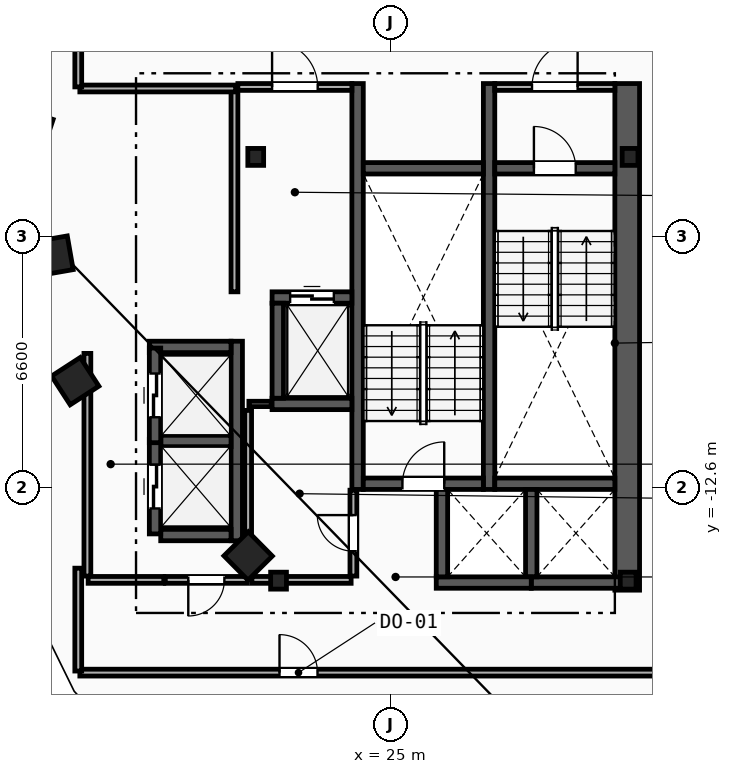
"""IFC4 building model, lengths in metres.
Left out: names, types, materials, properties, quantities, classifications, styles, units other than length and angle.
Written with IfcOpenShell. Run it as: python <this file> out.ifc"""

import sys

from ifc_helpers import new_model, si_unit, direction, frame, frame_2d, origin, origin_2d, place, context, subcontext, project, spatial, rectangle, i_section, extrude, element, fill, save


model = new_model("IFC4")
c1 = context("Model", 3, precision=1e-05, world=origin(), true_north=direction((0.0, 1.0)))
c2 = subcontext(c1, "Body", "Model", "MODEL_VIEW")
j1 = project(units=[si_unit("LENGTHUNIT", "METRE"), si_unit("PLANEANGLEUNIT", "RADIAN")], contexts=[c1])
p1 = place(None, origin())
s1 = spatial("IfcSite", under=j1, at=p1, CompositionType="ELEMENT")
p2 = place(p1, origin())
s2 = spatial("IfcBuilding", under=s1, at=p2, CompositionType="ELEMENT")
p3 = place(p2, frame((0.0, 0.0, 191.8)))
s3 = spatial("IfcBuildingStorey", under=s2, at=p3, CompositionType="ELEMENT", Elevation=191.8)
for number, where, z_axis, x_axis in (
    (1, (31.3, -3.9, 0.0), (0.0, 0.0, 1.0), (1.0, 0.0, 0.0)),
    (2, (21.45, -3.9, 0.0), (0.0, 0.0, 1.0), (1.0, 0.0, 0.0)),
    (3, (22.05, -15.05, 0.0), (0.0, 0.0, 1.0), (1.0, 0.0, 0.0)),
    (4, (31.25, -15.05, 0.0), (0.0, 0.0, 1.0), (1.0, 0.0, 0.0)),
):
    element("IfcColumn", number, at=place(p3, frame(where, z_axis=z_axis, x_axis=x_axis)), inside=s3, PredefinedType="COLUMN", context=c2, shape_type="SweptSolid", body=[
        extrude(i_section(OverallWidth=0.416, OverallDepth=0.446, WebThickness=0.039, FlangeThickness=0.063, FilletRadius=0.018, at=origin_2d()), origin(), (0.0, 0.0, 1.0), 3.6),
    ])
for number, where, z_axis, x_axis in (
    (5, (15.55, -3.2, 0.0), (0.0, 0.0, 1.0), (-0.315, -0.949, 0.0)),
    (6, (16.125, -6.5, 0.0), (0.0, 0.0, 1.0), (0.172, -0.985, 0.0)),
    (7, (16.7, -9.8, 0.0), (0.0, 0.0, 1.0), (0.544, -0.839, 0.0)),
    (8, (21.25, -14.4, 0.0), (0.0, 0.0, 1.0), (0.703, -0.711, 0.0)),
):
    element("IfcColumn", number, at=place(p3, frame(where, z_axis=z_axis, x_axis=x_axis)), inside=s3, PredefinedType="COLUMN", context=c2, shape_type="SweptSolid", body=[
        extrude(rectangle(XDim=0.9, YDim=0.9, at=origin_2d()), origin(), (0.0, 0.0, 1.0), 3.6),
    ])
p4 = place(p3, frame((31.225, -15.3, 0.0), z_axis=(0.0, 0.0, 1.0), x_axis=(0.0, 1.0, 0.0)))
e9 = element("IfcWall", 9, at=p4, inside=s3, PredefinedType="SHEAR", context=c2, shape_type="SweptSolid", body=[
    extrude(rectangle(XDim=13.33, YDim=0.65, at=frame_2d((6.665, 0.0))), origin(), (0.0, 0.0, 1.0), 3.34),
])
for number, where, z_axis, x_axis in (
    (10, (27.59, -12.65, 0.0), (0.0, 0.0, 1.0), (0.0, 1.0, 0.0)),
    (11, (24.13, -12.65, 0.0), (0.0, 0.0, 1.0), (0.0, 1.0, 0.0)),
):
    element("IfcWall", number, at=place(p3, frame(where, z_axis=z_axis, x_axis=x_axis)), inside=s3, PredefinedType="SHEAR", context=c2, shape_type="SweptSolid", body=[
        extrude(rectangle(XDim=10.68, YDim=0.3, at=frame_2d((5.34, 0.0))), origin(), (0.0, 0.0, 1.0), 3.34),
    ])
p5 = place(p3, frame((27.74, -4.2, 0.0), z_axis=(0.0, 0.0, 1.0), x_axis=(1.0, 0.0, 0.0)))
e12 = element("IfcWall", 12, at=p5, inside=s3, PredefinedType="SHEAR", context=c2, shape_type="SweptSolid", body=[
    extrude(rectangle(XDim=3.16, YDim=0.3, at=frame_2d((1.58, 0.0))), origin(), (0.0, 0.0, 1.0), 3.34),
])
p6 = place(p5, frame((1.03, 0.0, 0.0)))
e13 = element("IfcOpeningElement", 13, at=p6, cuts=e12, PredefinedType="OPENING", context=c2, shape_type="SweptSolid", body=[
    extrude(rectangle(XDim=1.1, YDim=2.15, at=frame_2d((0.55, 1.075))), frame((0.0, 0.16, 0.0), z_axis=(0.0, -1.0, 0.0), x_axis=(1.0, 0.0, 0.0)), (0.0, 0.0, 1.0), 0.32),
])
p7 = place(p3, frame((27.74, -12.5, 0.0), z_axis=(0.0, 0.0, 1.0), x_axis=(1.0, 0.0, 0.0)))
e14 = element("IfcWall", 14, at=p7, inside=s3, PredefinedType="SHEAR", context=c2, shape_type="SweptSolid", body=[
    extrude(rectangle(XDim=3.16, YDim=0.3, at=frame_2d((1.58, 0.0))), origin(), (0.0, 0.0, 1.0), 3.34),
])
p8 = place(p3, frame((24.28, -12.5, 0.0), z_axis=(0.0, 0.0, 1.0), x_axis=(1.0, 0.0, 0.0)))
e15 = element("IfcWall", 15, at=p8, inside=s3, PredefinedType="SHEAR", context=c2, shape_type="SweptSolid", body=[
    extrude(rectangle(XDim=3.16, YDim=0.3, at=frame_2d((1.58, 0.0))), origin(), (0.0, 0.0, 1.0), 3.34),
])
p9 = place(p8, frame((1.03, 0.0, 0.0)))
e16 = element("IfcOpeningElement", 16, at=p9, cuts=e15, PredefinedType="OPENING", context=c2, shape_type="SweptSolid", body=[
    extrude(rectangle(XDim=1.1, YDim=2.15, at=frame_2d((0.55, 1.075))), frame((0.0, 0.16, 0.0), z_axis=(0.0, -1.0, 0.0), x_axis=(1.0, 0.0, 0.0)), (0.0, 0.0, 1.0), 0.32),
])
p10 = place(p3, frame((24.28, -4.2, 0.0), z_axis=(0.0, 0.0, 1.0), x_axis=(1.0, 0.0, 0.0)))
e17 = element("IfcWall", 17, at=p10, inside=s3, PredefinedType="SHEAR", context=c2, shape_type="SweptSolid", body=[
    extrude(rectangle(XDim=3.16, YDim=0.3, at=frame_2d((1.58, 0.0))), origin(), (0.0, 0.0, 1.0), 3.34),
])
p11 = place(p3, frame((20.89, -7.45, 0.0), z_axis=(0.0, 0.0, 1.0), x_axis=(0.0, 1.0, 0.0)))
e18 = element("IfcWall", 18, at=p11, inside=s3, PredefinedType="PARTITIONING", context=c2, shape_type="SweptSolid", body=[
    extrude(rectangle(XDim=5.3, YDim=0.18, at=frame_2d((2.65, 0.0))), origin(), (0.0, 0.0, 1.0), 3.34),
])
p12 = place(p3, frame((20.98, -2.06, 0.0), z_axis=(0.0, 0.0, 1.0), x_axis=(1.0, 0.0, 0.0)))
e19 = element("IfcWall", 19, at=p12, inside=s3, PredefinedType="PARTITIONING", context=c2, shape_type="SweptSolid", body=[
    extrude(rectangle(XDim=3.0, YDim=0.18, at=frame_2d((1.5, 0.0))), origin(), (0.0, 0.0, 1.0), 3.34),
])
p13 = place(p12, frame((0.9, 0.0, 0.0)))
e20 = element("IfcOpeningElement", 20, at=p13, cuts=e19, PredefinedType="OPENING", context=c2, shape_type="SweptSolid", body=[
    extrude(rectangle(XDim=1.2, YDim=2.15, at=frame_2d((0.6, 1.075))), frame((0.0, 0.1, 0.0), z_axis=(0.0, -1.0, 0.0), x_axis=(1.0, 0.0, 0.0)), (0.0, 0.0, 1.0), 0.2),
])
p14 = place(p3, frame((27.74, -2.06, 0.0), z_axis=(0.0, 0.0, 1.0), x_axis=(1.0, 0.0, 0.0)))
e21 = element("IfcWall", 21, at=p14, inside=s3, PredefinedType="PARTITIONING", context=c2, shape_type="SweptSolid", body=[
    extrude(rectangle(XDim=3.16, YDim=0.18, at=frame_2d((1.58, 0.0))), origin(), (0.0, 0.0, 1.0), 3.34),
])
p15 = place(p14, frame((0.98, 0.0, 0.0)))
e22 = element("IfcOpeningElement", 22, at=p15, cuts=e21, PredefinedType="OPENING", context=c2, shape_type="SweptSolid", body=[
    extrude(rectangle(XDim=1.2, YDim=2.15, at=frame_2d((0.6, 1.075))), frame((0.0, 0.1, 0.0), z_axis=(0.0, -1.0, 0.0), x_axis=(1.0, 0.0, 0.0)), (0.0, 0.0, 1.0), 0.2),
])
p16 = place(p3, frame((21.88, -7.6, 0.0), z_axis=(0.0, 0.0, 1.0), x_axis=(1.0, 0.0, 0.0)))
e23 = element("IfcWall", 23, at=p16, inside=s3, PredefinedType="SHEAR", context=c2, shape_type="SweptSolid", body=[
    extrude(rectangle(XDim=2.1, YDim=0.3, at=frame_2d((1.05, 0.0))), origin(), (0.0, 0.0, 1.0), 3.34),
])
p17 = place(p16, frame((0.475, 0.0, 0.0)))
e24 = element("IfcOpeningElement", 24, at=p17, cuts=e23, PredefinedType="OPENING", context=c2, shape_type="SweptSolid", body=[
    extrude(rectangle(XDim=1.15, YDim=2.2, at=frame_2d((0.575, 1.1))), frame((0.0, 0.16, 0.0), z_axis=(0.0, -1.0, 0.0), x_axis=(1.0, 0.0, 0.0)), (0.0, 0.0, 1.0), 0.32),
])
p18 = place(p3, frame((21.88, -10.4, 0.0), z_axis=(0.0, 0.0, 1.0), x_axis=(1.0, 0.0, 0.0)))
e25 = element("IfcWall", 25, at=p18, inside=s3, PredefinedType="SHEAR", context=c2, shape_type="SweptSolid", body=[
    extrude(rectangle(XDim=2.1, YDim=0.3, at=frame_2d((1.05, 0.0))), origin(), (0.0, 0.0, 1.0), 3.34),
])
for number, where, z_axis, x_axis in (
    (26, (22.03, -10.25, 0.0), (0.0, 0.0, 1.0), (0.0, 1.0, 0.0)),
    (27, (28.7, -15.1, 0.0), (0.0, 0.0, 1.0), (1.0, 0.0, 0.0)),
):
    element("IfcWall", number, at=place(p3, frame(where, z_axis=z_axis, x_axis=x_axis)), inside=s3, PredefinedType="SHEAR", context=c2, shape_type="SweptSolid", body=[
        extrude(rectangle(XDim=2.5, YDim=0.3, at=frame_2d((1.25, 0.0))), origin(), (0.0, 0.0, 1.0), 3.34),
    ])
p19 = place(p3, frame((28.7, -14.95, 0.0), z_axis=(0.0, 0.0, 1.0), x_axis=(0.0, 1.0, 0.0)))
e28 = element("IfcWall", 28, at=p19, inside=s3, PredefinedType="SHEAR", context=c2, shape_type="SweptSolid", body=[
    extrude(rectangle(XDim=2.3, YDim=0.3, at=frame_2d((1.15, 0.0))), origin(), (0.0, 0.0, 1.0), 3.34),
])
p20 = place(p3, frame((26.2, -15.1, 0.0), z_axis=(0.0, 0.0, 1.0), x_axis=(1.0, 0.0, 0.0)))
e29 = element("IfcWall", 29, at=p20, inside=s3, PredefinedType="SHEAR", context=c2, shape_type="SweptSolid", body=[
    extrude(rectangle(XDim=2.5, YDim=0.3, at=frame_2d((1.25, 0.0))), origin(), (0.0, 0.0, 1.0), 3.34),
])
p21 = place(p3, frame((26.35, -14.95, 0.0), z_axis=(0.0, 0.0, 1.0), x_axis=(0.0, 1.0, 0.0)))
e30 = element("IfcWall", 30, at=p21, inside=s3, PredefinedType="SHEAR", context=c2, shape_type="SweptSolid", body=[
    extrude(rectangle(XDim=2.3, YDim=0.3, at=frame_2d((1.15, 0.0))), origin(), (0.0, 0.0, 1.0), 3.34),
])
p22 = place(p3, frame((20.95, -14.0, 0.0), z_axis=(0.0, 0.0, 1.0), x_axis=(0.0, 1.0, 0.0)))
e31 = element("IfcWall", 31, at=p22, inside=s3, PredefinedType="SHEAR", context=c2, shape_type="SweptSolid", body=[
    extrude(rectangle(XDim=5.25, YDim=0.3, at=frame_2d((2.625, 0.0))), origin(), (0.0, 0.0, 1.0), 3.34),
])
p23 = place(p3, frame((18.95, -13.85, 0.0), z_axis=(0.0, 0.0, 1.0), x_axis=(1.0, 0.0, 0.0)))
e32 = element("IfcWall", 32, at=p23, inside=s3, PredefinedType="SHEAR", context=c2, shape_type="SweptSolid", body=[
    extrude(rectangle(XDim=1.85, YDim=0.3, at=frame_2d((0.925, 0.0))), origin(), (0.0, 0.0, 1.0), 3.34),
])
p24 = place(p3, frame((18.65, -8.9, 0.0), z_axis=(0.0, 0.0, 1.0), x_axis=(1.0, 0.0, 0.0)))
e33 = element("IfcWall", 33, at=p24, inside=s3, PredefinedType="SHEAR", context=c2, shape_type="SweptSolid", body=[
    extrude(rectangle(XDim=2.15, YDim=0.3, at=frame_2d((1.075, 0.0))), origin(), (0.0, 0.0, 1.0), 3.34),
])
p25 = place(p3, frame((18.95, -11.375, 0.0), z_axis=(0.0, 0.0, 1.0), x_axis=(1.0, 0.0, 0.0)))
e34 = element("IfcWall", 34, at=p25, inside=s3, PredefinedType="SHEAR", context=c2, shape_type="SweptSolid", body=[
    extrude(rectangle(XDim=1.85, YDim=0.3, at=frame_2d((0.925, 0.0))), origin(), (0.0, 0.0, 1.0), 3.34),
])
p26 = place(p3, frame((18.8, -13.82, 0.0), z_axis=(0.0, 0.0, 1.0), x_axis=(0.0, 1.0, 0.0)))
e35 = element("IfcWall", 35, at=p26, inside=s3, PredefinedType="SHEAR", context=c2, shape_type="SweptSolid", body=[
    extrude(rectangle(XDim=2.49, YDim=0.3, at=frame_2d((1.245, 0.0))), origin(), (0.0, 0.0, 1.0), 3.34),
])
p27 = place(p26, frame((0.67, 0.0, 0.0)))
e36 = element("IfcOpeningElement", 36, at=p27, cuts=e35, PredefinedType="OPENING", context=c2, shape_type="SweptSolid", body=[
    extrude(rectangle(XDim=1.15, YDim=2.2, at=frame_2d((0.575, 1.1))), frame((0.0, 0.16, 0.0), z_axis=(0.0, -1.0, 0.0), x_axis=(1.0, 0.0, 0.0)), (0.0, 0.0, 1.0), 0.32),
])
p28 = place(p3, frame((18.8, -11.42, 0.0), z_axis=(0.0, 0.0, 1.0), x_axis=(0.0, 1.0, 0.0)))
e37 = element("IfcWall", 37, at=p28, inside=s3, PredefinedType="SHEAR", context=c2, shape_type="SweptSolid", body=[
    extrude(rectangle(XDim=2.49, YDim=0.3, at=frame_2d((1.245, 0.0))), origin(), (0.0, 0.0, 1.0), 3.34),
])
p29 = place(p28, frame((0.67, 0.0, 0.0)))
e38 = element("IfcOpeningElement", 38, at=p29, cuts=e37, PredefinedType="OPENING", context=c2, shape_type="SweptSolid", body=[
    extrude(rectangle(XDim=1.15, YDim=2.2, at=frame_2d((0.575, 1.1))), frame((0.0, 0.16, 0.0), z_axis=(0.0, -1.0, 0.0), x_axis=(1.0, 0.0, 0.0)), (0.0, 0.0, 1.0), 0.32),
])
p30 = place(p3, frame((17.02, -14.93, 0.0), z_axis=(0.0, 0.0, 1.0), x_axis=(0.0, 1.0, 0.0)))
e39 = element("IfcWall", 39, at=p30, inside=s3, PredefinedType="PARTITIONING", context=c2, shape_type="SweptSolid", body=[
    extrude(rectangle(XDim=5.86, YDim=0.18, at=frame_2d((2.93, 0.0))), origin(), (0.0, 0.0, 1.0), 3.34),
])
p31 = place(p3, frame((17.04, -15.03, 0.0), z_axis=(0.0, 0.0, 1.0), x_axis=(1.0, 0.0, 0.0)))
e40 = element("IfcWall", 40, at=p31, inside=s3, PredefinedType="PARTITIONING", context=c2, shape_type="SweptSolid", body=[
    extrude(rectangle(XDim=1.99, YDim=0.18, at=frame_2d((0.995, 0.0))), origin(), (0.0, 0.0, 1.0), 3.34),
])
p32 = place(p3, frame((21.23, -15.03, 0.0), z_axis=(0.0, 0.0, 1.0), x_axis=(-1.0, 0.0, 0.0)))
e41 = element("IfcWall", 41, at=p32, inside=s3, PredefinedType="PARTITIONING", context=c2, shape_type="SweptSolid", body=[
    extrude(rectangle(XDim=2.16, YDim=0.18, at=frame_2d((1.08, 0.0))), origin(), (0.0, 0.0, 1.0), 3.34),
])
p33 = place(p32, frame((0.605, 0.0, 0.0)))
e42 = element("IfcOpeningElement", 42, at=p33, cuts=e41, PredefinedType="OPENING", context=c2, shape_type="SweptSolid", body=[
    extrude(rectangle(XDim=0.95, YDim=2.1, at=frame_2d((0.475, 1.05))), frame((0.0, 0.1, 0.0), z_axis=(0.0, -1.0, 0.0), x_axis=(1.0, 0.0, 0.0)), (0.0, 0.0, 1.0), 0.2),
])
p34 = place(p3, frame((21.27, -10.4, 0.0), z_axis=(0.0, 0.0, 1.0), x_axis=(1.0, 0.0, 0.0)))
e43 = element("IfcWall", 43, at=p34, inside=s3, PredefinedType="PARTITIONING", context=c2, shape_type="SweptSolid", body=[
    extrude(rectangle(XDim=0.59, YDim=0.14, at=frame_2d((0.295, 0.0))), origin(), (0.0, 0.0, 1.0), 3.34),
])
p35 = place(p3, frame((21.25, -14.93, 0.0), z_axis=(0.0, 0.0, 1.0), x_axis=(0.0, 1.0, 0.0)))
e44 = element("IfcWall", 44, at=p35, inside=s3, PredefinedType="PARTITIONING", context=c2, shape_type="SweptSolid", body=[
    extrude(rectangle(XDim=4.36, YDim=0.18, at=frame_2d((2.18, 0.0))), origin(), (0.0, 0.0, 1.0), 3.34),
])
p36 = place(p3, frame((21.35, -15.03, 0.0), z_axis=(0.0, 0.0, 1.0), x_axis=(1.0, 0.0, 0.0)))
e45 = element("IfcWall", 45, at=p36, inside=s3, PredefinedType="PARTITIONING", context=c2, shape_type="SweptSolid", body=[
    extrude(rectangle(XDim=2.61, YDim=0.18, at=frame_2d((1.305, 0.0))), origin(), (0.0, 0.0, 1.0), 2.413),
])
p37 = place(p3, frame((24.02, -14.93, 0.0), z_axis=(0.0, 0.0, 1.0), x_axis=(0.0, 1.0, 0.0)))
e46 = element("IfcWall", 46, at=p37, inside=s3, PredefinedType="PARTITIONING", context=c2, shape_type="SweptSolid", body=[
    extrude(rectangle(XDim=2.26, YDim=0.18, at=frame_2d((1.13, 0.0))), origin(), (0.0, 0.0, 1.0), 3.34),
])
p38 = place(p37, frame((0.655, 0.0, 0.0)))
e47 = element("IfcOpeningElement", 47, at=p38, cuts=e46, PredefinedType="OPENING", context=c2, shape_type="SweptSolid", body=[
    extrude(rectangle(XDim=0.95, YDim=2.1, at=frame_2d((0.475, 1.05))), frame((0.0, 0.1, 0.0), z_axis=(0.0, -1.0, 0.0), x_axis=(1.0, 0.0, 0.0)), (0.0, 0.0, 1.0), 0.2),
])
p39 = place(p3, frame((16.822, -17.47, 0.0), z_axis=(0.0, 0.0, 1.0), x_axis=(1.0, 0.0, 0.0)))
e48 = element("IfcWall", 48, at=p39, inside=s3, PredefinedType="PARTITIONING", context=c2, shape_type="SweptSolid", body=[
    extrude(rectangle(XDim=15.908, YDim=0.18, at=frame_2d((7.954, 0.0))), origin(), (0.0, 0.0, 1.0), 3.34),
])
p40 = place(p39, frame((5.254, 0.0, 0.0)))
e49 = element("IfcOpeningElement", 49, at=p40, cuts=e48, PredefinedType="OPENING", context=c2, shape_type="SweptSolid", body=[
    extrude(rectangle(XDim=1.0, YDim=2.15, at=frame_2d((0.5, 1.075))), frame((0.0, 0.1, 0.0), z_axis=(0.0, -1.0, 0.0), x_axis=(1.0, 0.0, 0.0)), (0.0, 0.0, 1.0), 0.2),
])
p41 = place(p3, frame((16.822, -2.1, 0.0), z_axis=(0.0, 0.0, 1.0), x_axis=(1.0, 0.0, 0.0)))
e50 = element("IfcWall", 50, at=p41, inside=s3, PredefinedType="PARTITIONING", context=c2, shape_type="SweptSolid", body=[
    extrude(rectangle(XDim=4.098, YDim=0.18, at=frame_2d((2.049, 0.0))), origin(), (0.0, 0.0, 1.0), 3.34),
])
p42 = place(p3, frame((16.78, -14.721, 0.0), z_axis=(0.0, 0.0, 1.0), x_axis=(0.0, -1.0, 0.0)))
e51 = element("IfcWall", 51, at=p42, inside=s3, PredefinedType="PARTITIONING", context=c2, shape_type="SweptSolid", body=[
    extrude(rectangle(XDim=2.707, YDim=0.18, at=frame_2d((1.354, 0.0))), origin(), (0.0, 0.0, 1.0), 3.34),
])
p43 = place(p3, frame((16.78, 0.329, 0.0), z_axis=(0.0, 0.0, 1.0), x_axis=(0.0, -1.0, 0.0)))
e52 = element("IfcWall", 52, at=p43, inside=s3, PredefinedType="PARTITIONING", context=c2, shape_type="SweptSolid", body=[
    extrude(rectangle(XDim=2.387, YDim=0.18, at=frame_2d((1.194, 0.0))), origin(), (0.0, 0.0, 1.0), 3.34),
])
p44 = place(p6, origin())
e53 = element("IfcDoor", 53, at=p44, inside=s3, OperationType="SINGLE_SWING_LEFT", PredefinedType="DOOR", context=c2, shape_type="SweptSolid", body=[
    extrude(rectangle(XDim=1.1, YDim=2.15, at=frame_2d((0.55, 1.075))), frame((0.0, 0.025, 0.0), z_axis=(0.0, -1.0, 0.0), x_axis=(1.0, 0.0, 0.0)), (0.0, 0.0, 1.0), 0.05),
])
fill(e13, e53)
p45 = place(p9, origin())
e54 = element("IfcDoor", 54, at=p45, inside=s3, OperationType="SINGLE_SWING_RIGHT", PredefinedType="DOOR", context=c2, shape_type="SweptSolid", body=[
    extrude(rectangle(XDim=1.1, YDim=2.15, at=frame_2d((0.55, 1.075))), frame((0.0, 0.025, 0.0), z_axis=(0.0, -1.0, 0.0), x_axis=(1.0, 0.0, 0.0)), (0.0, 0.0, 1.0), 0.05),
])
fill(e16, e54)
p46 = place(p13, origin())
e55 = element("IfcDoor", 55, at=p46, inside=s3, OperationType="SINGLE_SWING_LEFT", PredefinedType="DOOR", context=c2, shape_type="SweptSolid", body=[
    extrude(rectangle(XDim=1.2, YDim=2.15, at=frame_2d((0.6, 1.075))), frame((0.0, 0.025, 0.0), z_axis=(0.0, -1.0, 0.0), x_axis=(1.0, 0.0, 0.0)), (0.0, 0.0, 1.0), 0.05),
])
fill(e20, e55)
p47 = place(p15, origin())
e56 = element("IfcDoor", 56, at=p47, inside=s3, OperationType="SINGLE_SWING_RIGHT", PredefinedType="DOOR", context=c2, shape_type="SweptSolid", body=[
    extrude(rectangle(XDim=1.2, YDim=2.15, at=frame_2d((0.6, 1.075))), frame((0.0, 0.025, 0.0), z_axis=(0.0, -1.0, 0.0), x_axis=(1.0, 0.0, 0.0)), (0.0, 0.0, 1.0), 0.05),
])
fill(e22, e56)
p48 = place(p17, origin())
e57 = element("IfcDoor", 57, at=p48, inside=s3, OperationType="SLIDING_TO_LEFT", PredefinedType="TRAPDOOR", context=c2, shape_type="SweptSolid", body=[
    extrude(rectangle(XDim=1.15, YDim=2.2, at=frame_2d((0.575, 1.1))), frame((0.0, 0.025, 0.0), z_axis=(0.0, -1.0, 0.0), x_axis=(1.0, 0.0, 0.0)), (0.0, 0.0, 1.0), 0.05),
])
fill(e24, e57)
p49 = place(p27, origin())
e58 = element("IfcDoor", 58, at=p49, inside=s3, OperationType="SLIDING_TO_LEFT", PredefinedType="TRAPDOOR", context=c2, shape_type="SweptSolid", body=[
    extrude(rectangle(XDim=1.15, YDim=2.2, at=frame_2d((0.575, 1.1))), frame((0.0, 0.025, 0.0), z_axis=(0.0, -1.0, 0.0), x_axis=(1.0, 0.0, 0.0)), (0.0, 0.0, 1.0), 0.05),
])
fill(e36, e58)
p50 = place(p29, origin())
e59 = element("IfcDoor", 59, at=p50, inside=s3, OperationType="SLIDING_TO_LEFT", PredefinedType="TRAPDOOR", context=c2, shape_type="SweptSolid", body=[
    extrude(rectangle(XDim=1.15, YDim=2.2, at=frame_2d((0.575, 1.1))), frame((0.0, 0.025, 0.0), z_axis=(0.0, -1.0, 0.0), x_axis=(1.0, 0.0, 0.0)), (0.0, 0.0, 1.0), 0.05),
])
fill(e38, e59)
p51 = place(p40, origin())
e60 = element("IfcDoor", 60, at=p51, inside=s3, OperationType="SINGLE_SWING_LEFT", PredefinedType="DOOR", context=c2, shape_type="SweptSolid", body=[
    extrude(rectangle(XDim=1.0, YDim=2.15, at=frame_2d((0.5, 1.075))), frame((0.0, 0.025, 0.0), z_axis=(0.0, -1.0, 0.0), x_axis=(1.0, 0.0, 0.0)), (0.0, 0.0, 1.0), 0.05),
])
fill(e49, e60)
p52 = place(p38, origin())
e61 = element("IfcDoor", 61, at=p52, inside=s3, OperationType="SINGLE_SWING_RIGHT", PredefinedType="DOOR", context=c2, shape_type="SweptSolid", body=[
    extrude(rectangle(XDim=0.95, YDim=2.1, at=frame_2d((0.475, 1.05))), frame((0.0, 0.025, 0.0), z_axis=(0.0, -1.0, 0.0), x_axis=(1.0, 0.0, 0.0)), (0.0, 0.0, 1.0), 0.05),
])
fill(e47, e61)
p53 = place(p33, origin())
e62 = element("IfcDoor", 62, at=p53, inside=s3, OperationType="SINGLE_SWING_RIGHT", PredefinedType="DOOR", context=c2, shape_type="SweptSolid", body=[
    extrude(rectangle(XDim=0.95, YDim=2.1, at=frame_2d((0.475, 1.05))), frame((0.0, 0.025, 0.0), z_axis=(0.0, -1.0, 0.0), x_axis=(1.0, 0.0, 0.0)), (0.0, 0.0, 1.0), 0.05),
])
fill(e42, e62)
save(model, sys.argv[1])
